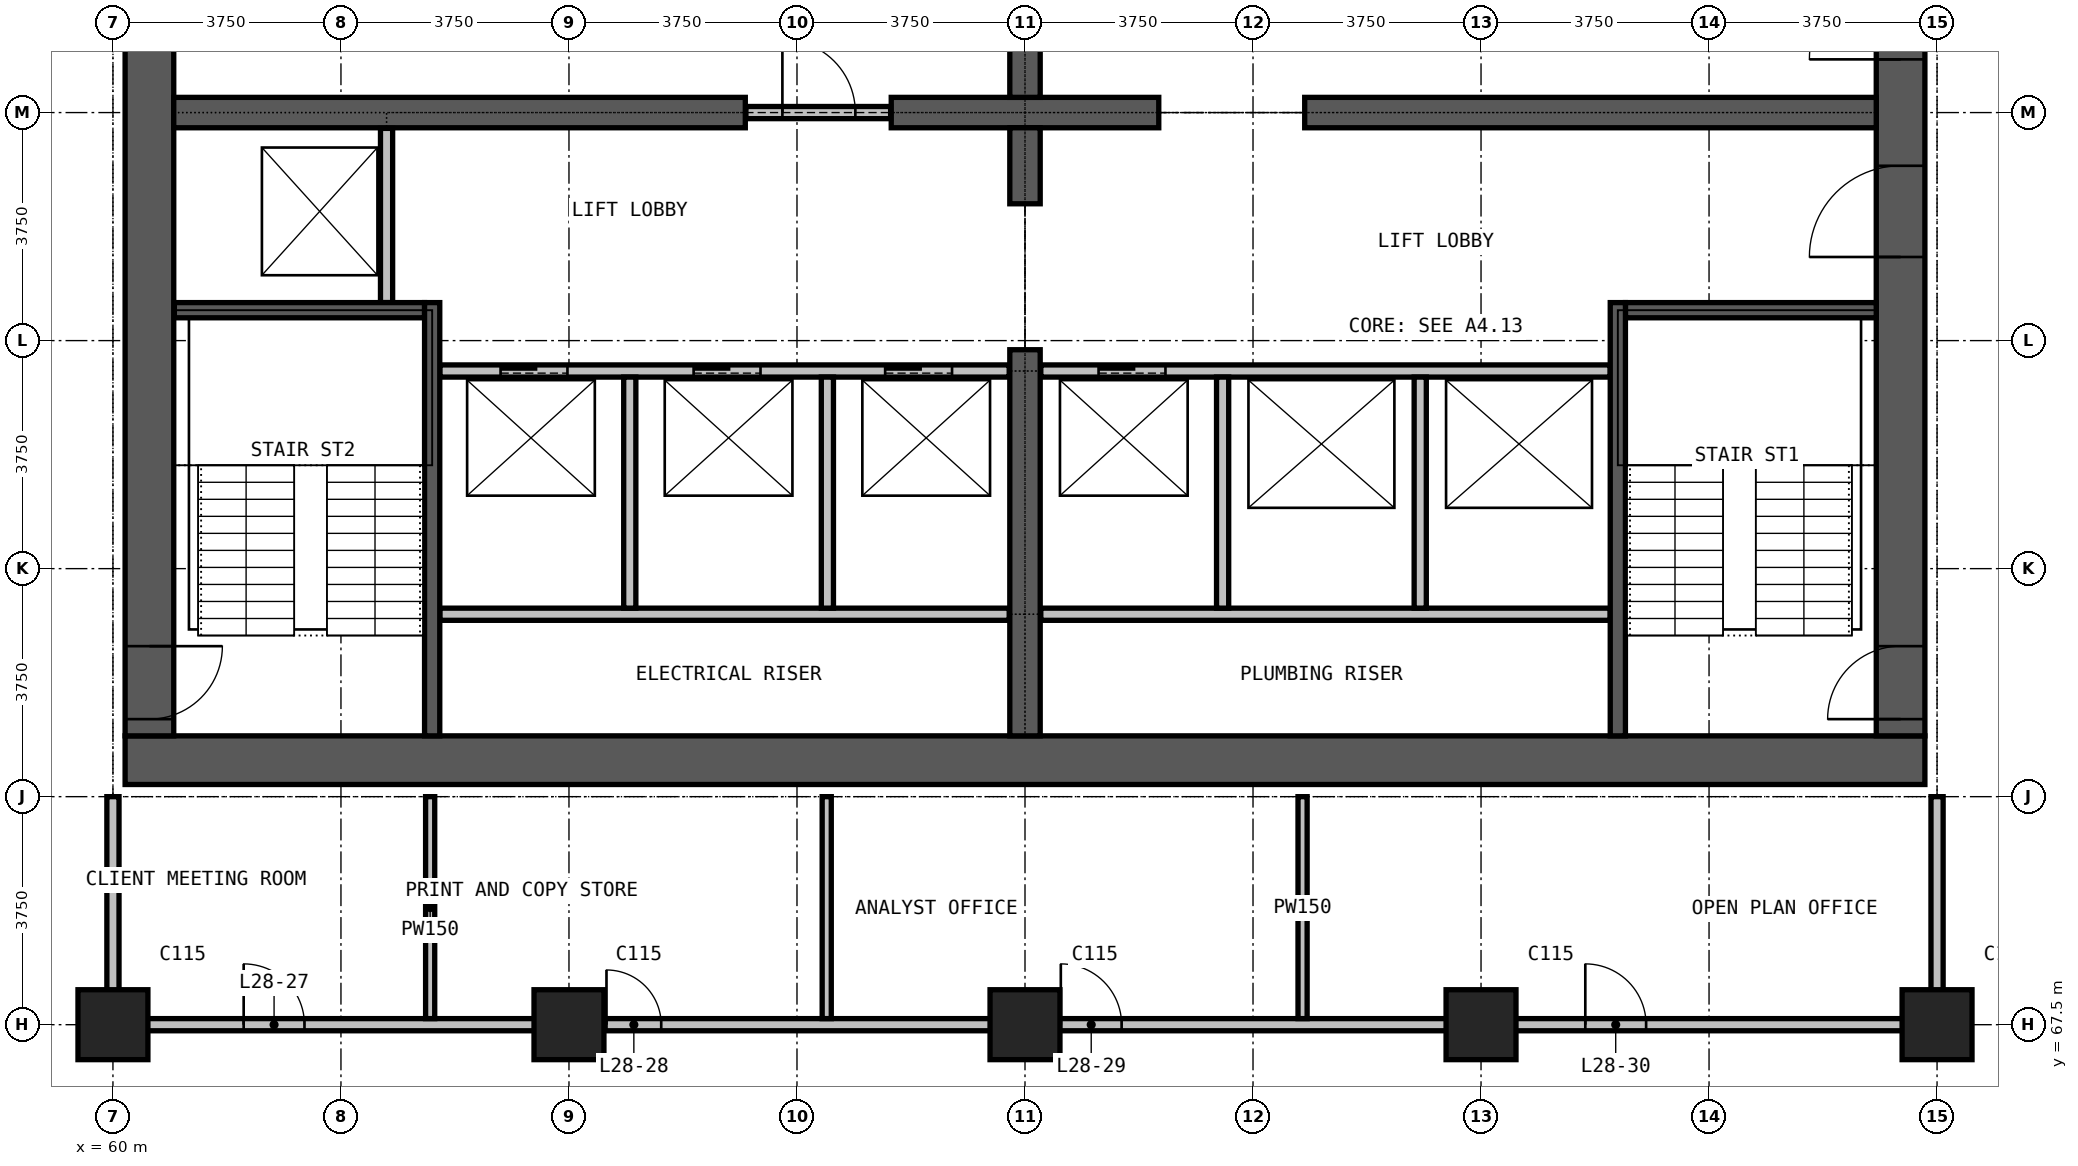
"""IFC4 building model, lengths in metres.
Left out: names, types, materials, properties, quantities, classifications, styles, units other than length and angle.
Written with IfcOpenShell. Run it as: python <this file> out.ifc"""

import sys

from ifc_helpers import new_model, si_unit, direction, frame, frame_2d, origin, origin_2d, place, context, subcontext, project, spatial, rectangle, extrude, element, fill, save


model = new_model("IFC4")
c1 = context("Model", 3, precision=1e-05, world=origin(), true_north=direction((0.0, 1.0)))
c2 = subcontext(c1, "Body", "Model", "MODEL_VIEW")
j1 = project(units=[si_unit("LENGTHUNIT", "METRE"), si_unit("PLANEANGLEUNIT", "RADIAN")], contexts=[c1])
p1 = place(None, origin())
s1 = spatial("IfcSite", under=j1, at=p1, CompositionType="ELEMENT")
p2 = place(p1, origin())
s2 = spatial("IfcBuilding", under=s1, at=p2, CompositionType="ELEMENT")
p3 = place(p2, frame((0.0, 0.0, 114.4)))
s3 = spatial("IfcBuildingStorey", under=s2, at=p3, CompositionType="ELEMENT", Elevation=114.4)
for number, where, z_axis, x_axis in (
    (1, (60.0, 67.5, 0.0), (0.0, 0.0, 1.0), (1.0, 0.0, 0.0)),
    (2, (67.5, 67.5, 0.0), (0.0, 0.0, 1.0), (1.0, 0.0, 0.0)),
    (3, (75.0, 67.5, 0.0), (0.0, 0.0, 1.0), (1.0, 0.0, 0.0)),
    (4, (82.5, 67.5, 0.0), (0.0, 0.0, 1.0), (1.0, 0.0, 0.0)),
    (5, (90.0, 67.5, 0.0), (0.0, 0.0, 1.0), (1.0, 0.0, 0.0)),
):
    element("IfcColumn", number, at=place(p3, frame(where, z_axis=z_axis, x_axis=x_axis)), inside=s3, PredefinedType="COLUMN", context=c2, shape_type="SweptSolid", body=[
        extrude(rectangle(XDim=1.15, YDim=1.15, at=origin_2d()), origin(), (0.0, 0.0, 1.0), 3.6),
    ])
p4 = place(p3, frame((60.2, 71.85, 0.0), z_axis=(0.0, 0.0, 1.0), x_axis=(1.0, 0.0, 0.0)))
e6 = element("IfcWall", 6, at=p4, inside=s3, PredefinedType="SHEAR", context=c2, shape_type="SweptSolid", body=[
    extrude(rectangle(XDim=29.6, YDim=0.8, at=frame_2d((14.8, 0.0))), origin(), (0.0, 0.0, 1.0), 3.6),
])
p5 = place(p3, frame((89.4, 72.25, 0.0), z_axis=(0.0, 0.0, 1.0), x_axis=(0.0, 1.0, 0.0)))
e7 = element("IfcWall", 7, at=p5, inside=s3, PredefinedType="SHEAR", context=c2, shape_type="SweptSolid", body=[
    extrude(rectangle(XDim=20.5, YDim=0.8, at=frame_2d((10.25, 0.0))), origin(), (0.0, 0.0, 1.0), 3.6),
])
p6 = place(p5, frame((0.275, 0.0, 0.0)))
e8 = element("IfcOpeningElement", 8, at=p6, cuts=e7, PredefinedType="OPENING", context=c2, shape_type="SweptSolid", body=[
    extrude(rectangle(XDim=1.2, YDim=2.2, at=frame_2d((0.6, 1.1))), frame((0.0, 0.41, 0.0), z_axis=(0.0, -1.0, 0.0), x_axis=(1.0, 0.0, 0.0)), (0.0, 0.0, 1.0), 0.82),
])
p7 = place(p5, frame((13.775, 0.0, 0.0)))
e9 = element("IfcOpeningElement", 9, at=p7, cuts=e7, PredefinedType="OPENING", context=c2, shape_type="SweptSolid", body=[
    extrude(rectangle(XDim=1.2, YDim=2.2, at=frame_2d((0.6, 1.1))), frame((0.0, 0.41, 0.0), z_axis=(0.0, -1.0, 0.0), x_axis=(1.0, 0.0, 0.0)), (0.0, 0.0, 1.0), 0.82),
])
p8 = place(p5, frame((7.875, 0.0, 0.0)))
e10 = element("IfcOpeningElement", 10, at=p8, cuts=e7, PredefinedType="OPENING", context=c2, shape_type="SweptSolid", body=[
    extrude(rectangle(XDim=1.5, YDim=2.2, at=frame_2d((0.75, 1.1))), frame((0.0, 0.41, 0.0), z_axis=(0.0, -1.0, 0.0), x_axis=(1.0, 0.0, 0.0)), (0.0, 0.0, 1.0), 0.82),
])
p9 = place(p5, frame((11.125, 0.0, 0.0)))
e11 = element("IfcOpeningElement", 11, at=p9, cuts=e7, PredefinedType="OPENING", context=c2, shape_type="SweptSolid", body=[
    extrude(rectangle(XDim=1.5, YDim=2.2, at=frame_2d((0.75, 1.1))), frame((0.0, 0.41, 0.0), z_axis=(0.0, -1.0, 0.0), x_axis=(1.0, 0.0, 0.0)), (0.0, 0.0, 1.0), 0.82),
])
p10 = place(p3, frame((60.6, 92.75, 0.0), z_axis=(0.0, 0.0, 1.0), x_axis=(0.0, -1.0, 0.0)))
e12 = element("IfcWall", 12, at=p10, inside=s3, PredefinedType="SHEAR", context=c2, shape_type="SweptSolid", body=[
    extrude(rectangle(XDim=20.5, YDim=0.8, at=frame_2d((10.25, 0.0))), origin(), (0.0, 0.0, 1.0), 3.6),
])
p11 = place(p10, frame((19.025, 0.0, 0.0)))
e13 = element("IfcOpeningElement", 13, at=p11, cuts=e12, PredefinedType="OPENING", context=c2, shape_type="SweptSolid", body=[
    extrude(rectangle(XDim=1.2, YDim=2.2, at=frame_2d((0.6, 1.1))), frame((0.0, 0.41, 0.0), z_axis=(0.0, -1.0, 0.0), x_axis=(1.0, 0.0, 0.0)), (0.0, 0.0, 1.0), 0.82),
])
p12 = place(p10, frame((8.025, 0.0, 0.0)))
e14 = element("IfcOpeningElement", 14, at=p12, cuts=e12, PredefinedType="OPENING", context=c2, shape_type="SweptSolid", body=[
    extrude(rectangle(XDim=1.2, YDim=2.2, at=frame_2d((0.6, 1.1))), frame((0.0, 0.41, 0.0), z_axis=(0.0, -1.0, 0.0), x_axis=(1.0, 0.0, 0.0)), (0.0, 0.0, 1.0), 0.82),
])
p13 = place(p3, frame((61.0, 82.5, 0.0), z_axis=(0.0, 0.0, 1.0), x_axis=(1.0, 0.0, 0.0)))
e15 = element("IfcWall", 15, at=p13, inside=s3, PredefinedType="SHEAR", context=c2, shape_type="SweptSolid", body=[
    extrude(rectangle(XDim=9.4, YDim=0.5, at=frame_2d((4.7, 0.0))), origin(), (0.0, 0.0, 1.0), 3.6),
])
p14 = place(p3, frame((72.8, 82.5, 0.0), z_axis=(0.0, 0.0, 1.0), x_axis=(1.0, 0.0, 0.0)))
e16 = element("IfcWall", 16, at=p14, inside=s3, PredefinedType="SHEAR", context=c2, shape_type="SweptSolid", body=[
    extrude(rectangle(XDim=4.4, YDim=0.5, at=frame_2d((2.2, 0.0))), origin(), (0.0, 0.0, 1.0), 3.6),
])
p15 = place(p3, frame((79.6, 82.5, 0.0), z_axis=(0.0, 0.0, 1.0), x_axis=(1.0, 0.0, 0.0)))
e17 = element("IfcWall", 17, at=p15, inside=s3, PredefinedType="SHEAR", context=c2, shape_type="SweptSolid", body=[
    extrude(rectangle(XDim=9.4, YDim=0.5, at=frame_2d((4.7, 0.0))), origin(), (0.0, 0.0, 1.0), 3.6),
])
p16 = place(p3, frame((75.0, 72.25, 0.0), z_axis=(0.0, 0.0, 1.0), x_axis=(0.0, 1.0, 0.0)))
e18 = element("IfcWall", 18, at=p16, inside=s3, PredefinedType="SHEAR", context=c2, shape_type="SweptSolid", body=[
    extrude(rectangle(XDim=6.35, YDim=0.5, at=frame_2d((3.175, 0.0))), origin(), (0.0, 0.0, 1.0), 3.6),
])
for number, where, z_axis, x_axis in (
    (19, (75.0, 81.0, 0.0), (0.0, 0.0, 1.0), (0.0, 1.0, 0.0)),
    (20, (75.0, 82.75, 0.0), (0.0, 0.0, 1.0), (0.0, 1.0, 0.0)),
):
    element("IfcWall", number, at=place(p3, frame(where, z_axis=z_axis, x_axis=x_axis)), inside=s3, PredefinedType="SHEAR", context=c2, shape_type="SweptSolid", body=[
        extrude(rectangle(XDim=1.25, YDim=0.5, at=frame_2d((0.625, 0.0))), origin(), (0.0, 0.0, 1.0), 3.6),
    ])
p17 = place(p3, frame((70.41, 82.5, 0.0), z_axis=(0.0, 0.0, 1.0), x_axis=(1.0, 0.0, 0.0)))
e21 = element("IfcWall", 21, at=p17, inside=s3, PredefinedType="PARTITIONING", context=c2, shape_type="SweptSolid", body=[
    extrude(rectangle(XDim=2.38, YDim=0.2, at=frame_2d((1.19, 0.0))), origin(), (0.0, 0.0, 1.0), 2.4),
])
p18 = place(p17, frame((0.6, 0.0, 0.0)))
e22 = element("IfcOpeningElement", 22, at=p18, cuts=e21, PredefinedType="OPENING", context=c2, shape_type="SweptSolid", body=[
    extrude(rectangle(XDim=1.2, YDim=2.2, at=frame_2d((0.6, 1.1))), frame((0.0, 0.11, 0.0), z_axis=(0.0, -1.0, 0.0), x_axis=(1.0, 0.0, 0.0)), (0.0, 0.0, 1.0), 0.22),
])
p19 = place(p3, frame((60.1, 67.5, 0.0), z_axis=(0.0, 0.0, 1.0), x_axis=(1.0, 0.0, 0.0)))
e23 = element("IfcWall", 23, at=p19, inside=s3, PredefinedType="PARTITIONING", context=c2, shape_type="SweptSolid", body=[
    extrude(rectangle(XDim=29.8, YDim=0.2, at=frame_2d((14.9, 0.0))), origin(), (0.0, 0.0, 1.0), 3.3),
])
p20 = place(p19, frame((2.05, 0.0, 0.0)))
e24 = element("IfcOpeningElement", 24, at=p20, cuts=e23, PredefinedType="OPENING", context=c2, shape_type="SweptSolid", body=[
    extrude(rectangle(XDim=1.0, YDim=2.2, at=frame_2d((0.5, 1.1))), frame((0.0, 0.11, 0.0), z_axis=(0.0, -1.0, 0.0), x_axis=(1.0, 0.0, 0.0)), (0.0, 0.0, 1.0), 0.22),
])
p21 = place(p19, frame((8.017, 0.0, 0.0)))
e25 = element("IfcOpeningElement", 25, at=p21, cuts=e23, PredefinedType="OPENING", context=c2, shape_type="SweptSolid", body=[
    extrude(rectangle(XDim=0.9, YDim=2.2, at=frame_2d((0.45, 1.1))), frame((0.0, 0.11, 0.0), z_axis=(0.0, -1.0, 0.0), x_axis=(1.0, 0.0, 0.0)), (0.0, 0.0, 1.0), 0.22),
])
p22 = place(p19, frame((15.489, 0.0, 0.0)))
e26 = element("IfcOpeningElement", 26, at=p22, cuts=e23, PredefinedType="OPENING", context=c2, shape_type="SweptSolid", body=[
    extrude(rectangle(XDim=1.0, YDim=2.2, at=frame_2d((0.5, 1.1))), frame((0.0, 0.11, 0.0), z_axis=(0.0, -1.0, 0.0), x_axis=(1.0, 0.0, 0.0)), (0.0, 0.0, 1.0), 0.22),
])
p23 = place(p19, frame((24.115, 0.0, 0.0)))
e27 = element("IfcOpeningElement", 27, at=p23, cuts=e23, PredefinedType="OPENING", context=c2, shape_type="SweptSolid", body=[
    extrude(rectangle(XDim=1.0, YDim=2.2, at=frame_2d((0.5, 1.1))), frame((0.0, 0.11, 0.0), z_axis=(0.0, -1.0, 0.0), x_axis=(1.0, 0.0, 0.0)), (0.0, 0.0, 1.0), 0.22),
])
for number, where, z_axis, x_axis in (
    (28, (60.0, 67.4, 0.0), (0.0, 0.0, 1.0), (0.0, 1.0, 0.0)),
    (29, (90.0, 67.4, 0.0), (0.0, 0.0, 1.0), (0.0, 1.0, 0.0)),
):
    element("IfcWall", number, at=place(p3, frame(where, z_axis=z_axis, x_axis=x_axis)), inside=s3, PredefinedType="PARTITIONING", context=c2, shape_type="SweptSolid", body=[
        extrude(rectangle(XDim=3.85, YDim=0.2, at=frame_2d((1.925, 0.0))), origin(), (0.0, 0.0, 1.0), 3.3),
    ])
for number, where, z_axis, x_axis in (
    (30, (65.217, 67.6, 0.0), (0.0, 0.0, 1.0), (0.0, 1.0, 0.0)),
    (31, (71.739, 67.6, 0.0), (0.0, 0.0, 1.0), (0.0, 1.0, 0.0)),
    (32, (79.565, 67.6, 0.0), (0.0, 0.0, 1.0), (0.0, 1.0, 0.0)),
):
    element("IfcWall", number, at=place(p3, frame(where, z_axis=z_axis, x_axis=x_axis)), inside=s3, PredefinedType="PARTITIONING", context=c2, shape_type="SweptSolid", body=[
        extrude(rectangle(XDim=3.65, YDim=0.15, at=frame_2d((1.825, 0.0))), origin(), (0.0, 0.0, 1.0), 3.3),
    ])
for number, where, z_axis, x_axis in (
    (33, (65.375, 74.25, 0.0), (0.0, 0.0, 1.0), (1.0, 0.0, 0.0)),
    (34, (75.26, 74.25, 0.0), (0.0, 0.0, 1.0), (1.0, 0.0, 0.0)),
):
    element("IfcWall", number, at=place(p3, frame(where, z_axis=z_axis, x_axis=x_axis)), inside=s3, PredefinedType="PARTITIONING", context=c2, shape_type="SweptSolid", body=[
        extrude(rectangle(XDim=9.365, YDim=0.2, at=frame_2d((4.683, 0.0))), origin(), (0.0, 0.0, 1.0), 3.3),
    ])
p24 = place(p3, frame((65.375, 78.25, 0.0), z_axis=(0.0, 0.0, 1.0), x_axis=(1.0, 0.0, 0.0)))
e35 = element("IfcWall", 35, at=p24, inside=s3, PredefinedType="PARTITIONING", context=c2, shape_type="SweptSolid", body=[
    extrude(rectangle(XDim=9.365, YDim=0.2, at=frame_2d((4.683, 0.0))), origin(), (0.0, 0.0, 1.0), 3.3),
])
p25 = place(p24, frame((1.0, 0.0, 0.0)))
e36 = element("IfcOpeningElement", 36, at=p25, cuts=e35, PredefinedType="OPENING", context=c2, shape_type="SweptSolid", body=[
    extrude(rectangle(XDim=1.1, YDim=2.2, at=frame_2d((0.55, 1.1))), frame((0.0, 0.11, 0.0), z_axis=(0.0, -1.0, 0.0), x_axis=(1.0, 0.0, 0.0)), (0.0, 0.0, 1.0), 0.22),
])
p26 = place(p24, frame((4.175, 0.0, 0.0)))
e37 = element("IfcOpeningElement", 37, at=p26, cuts=e35, PredefinedType="OPENING", context=c2, shape_type="SweptSolid", body=[
    extrude(rectangle(XDim=1.1, YDim=2.2, at=frame_2d((0.55, 1.1))), frame((0.0, 0.11, 0.0), z_axis=(0.0, -1.0, 0.0), x_axis=(1.0, 0.0, 0.0)), (0.0, 0.0, 1.0), 0.22),
])
p27 = place(p24, frame((7.325, 0.0, 0.0)))
e38 = element("IfcOpeningElement", 38, at=p27, cuts=e35, PredefinedType="OPENING", context=c2, shape_type="SweptSolid", body=[
    extrude(rectangle(XDim=1.1, YDim=2.2, at=frame_2d((0.55, 1.1))), frame((0.0, 0.11, 0.0), z_axis=(0.0, -1.0, 0.0), x_axis=(1.0, 0.0, 0.0)), (0.0, 0.0, 1.0), 0.22),
])
p28 = place(p3, frame((75.26, 78.25, 0.0), z_axis=(0.0, 0.0, 1.0), x_axis=(1.0, 0.0, 0.0)))
e39 = element("IfcWall", 39, at=p28, inside=s3, PredefinedType="PARTITIONING", context=c2, shape_type="SweptSolid", body=[
    extrude(rectangle(XDim=9.365, YDim=0.2, at=frame_2d((4.683, 0.0))), origin(), (0.0, 0.0, 1.0), 3.3),
])
p29 = place(p28, frame((0.95, 0.0, 0.0)))
e40 = element("IfcOpeningElement", 40, at=p29, cuts=e39, PredefinedType="OPENING", context=c2, shape_type="SweptSolid", body=[
    extrude(rectangle(XDim=1.1, YDim=2.2, at=frame_2d((0.55, 1.1))), frame((0.0, 0.11, 0.0), z_axis=(0.0, -1.0, 0.0), x_axis=(1.0, 0.0, 0.0)), (0.0, 0.0, 1.0), 0.22),
])
p30 = place(p3, frame((64.5, 79.375, 0.0), z_axis=(0.0, 0.0, 1.0), x_axis=(0.0, 1.0, 0.0)))
e41 = element("IfcWall", 41, at=p30, inside=s3, PredefinedType="PARTITIONING", context=c2, shape_type="SweptSolid", body=[
    extrude(rectangle(XDim=2.865, YDim=0.2, at=frame_2d((1.433, 0.0))), origin(), (0.0, 0.0, 1.0), 3.3),
])
for number, where, z_axis, x_axis in (
    (42, (68.5, 74.35, 0.0), (0.0, 0.0, 1.0), (0.0, 1.0, 0.0)),
    (43, (71.75, 74.35, 0.0), (0.0, 0.0, 1.0), (0.0, 1.0, 0.0)),
    (44, (78.25, 74.35, 0.0), (0.0, 0.0, 1.0), (0.0, 1.0, 0.0)),
    (45, (81.5, 74.35, 0.0), (0.0, 0.0, 1.0), (0.0, 1.0, 0.0)),
):
    element("IfcWall", number, at=place(p3, frame(where, z_axis=z_axis, x_axis=x_axis)), inside=s3, PredefinedType="PARTITIONING", context=c2, shape_type="SweptSolid", body=[
        extrude(rectangle(XDim=3.8, YDim=0.2, at=frame_2d((1.9, 0.0))), origin(), (0.0, 0.0, 1.0), 3.3),
    ])
p31 = place(p3, frame((61.01, 79.25, 0.0), z_axis=(0.0, 0.0, 1.0), x_axis=(1.0, 0.0, 0.0)))
e46 = element("IfcWall", 46, at=p31, inside=s3, PredefinedType="PARTITIONING", context=c2, shape_type="SweptSolid", body=[
    extrude(rectangle(XDim=4.115, YDim=0.25, at=frame_2d((2.058, 0.0))), origin(), (0.0, 0.0, 1.0), 3.3),
])
p32 = place(p3, frame((84.875, 79.25, 0.0), z_axis=(0.0, 0.0, 1.0), x_axis=(1.0, 0.0, 0.0)))
e47 = element("IfcWall", 47, at=p32, inside=s3, PredefinedType="PARTITIONING", context=c2, shape_type="SweptSolid", body=[
    extrude(rectangle(XDim=4.125, YDim=0.25, at=frame_2d((2.062, 0.0))), origin(), (0.0, 0.0, 1.0), 3.3),
])
for number, where, z_axis, x_axis in (
    (48, (65.25, 72.25, 0.0), (0.0, 0.0, 1.0), (0.0, 1.0, 0.0)),
    (49, (84.75, 72.25, 0.0), (0.0, 0.0, 1.0), (0.0, 1.0, 0.0)),
):
    element("IfcWall", number, at=place(p3, frame(where, z_axis=z_axis, x_axis=x_axis)), inside=s3, PredefinedType="PARTITIONING", context=c2, shape_type="SweptSolid", body=[
        extrude(rectangle(XDim=7.125, YDim=0.25, at=frame_2d((3.562, 0.0))), origin(), (0.0, 0.0, 1.0), 3.3),
    ])
p33 = place(p25, origin())
e50 = element("IfcDoor", 50, at=p33, inside=s3, OperationType="DOUBLE_DOOR_SLIDING", PredefinedType="DOOR", context=c2, shape_type="SweptSolid", body=[
    extrude(rectangle(XDim=1.1, YDim=2.2, at=frame_2d((0.55, 1.1))), frame((0.0, 0.025, 0.0), z_axis=(0.0, -1.0, 0.0), x_axis=(1.0, 0.0, 0.0)), (0.0, 0.0, 1.0), 0.05),
])
fill(e36, e50)
p34 = place(p26, origin())
e51 = element("IfcDoor", 51, at=p34, inside=s3, OperationType="DOUBLE_DOOR_SLIDING", PredefinedType="DOOR", context=c2, shape_type="SweptSolid", body=[
    extrude(rectangle(XDim=1.1, YDim=2.2, at=frame_2d((0.55, 1.1))), frame((0.0, 0.025, 0.0), z_axis=(0.0, -1.0, 0.0), x_axis=(1.0, 0.0, 0.0)), (0.0, 0.0, 1.0), 0.05),
])
fill(e37, e51)
p35 = place(p27, origin())
e52 = element("IfcDoor", 52, at=p35, inside=s3, OperationType="DOUBLE_DOOR_SLIDING", PredefinedType="DOOR", context=c2, shape_type="SweptSolid", body=[
    extrude(rectangle(XDim=1.1, YDim=2.2, at=frame_2d((0.55, 1.1))), frame((0.0, 0.025, 0.0), z_axis=(0.0, -1.0, 0.0), x_axis=(1.0, 0.0, 0.0)), (0.0, 0.0, 1.0), 0.05),
])
fill(e38, e52)
p36 = place(p29, origin())
e53 = element("IfcDoor", 53, at=p36, inside=s3, OperationType="DOUBLE_DOOR_SLIDING", PredefinedType="DOOR", context=c2, shape_type="SweptSolid", body=[
    extrude(rectangle(XDim=1.1, YDim=2.2, at=frame_2d((0.55, 1.1))), frame((0.0, 0.025, 0.0), z_axis=(0.0, -1.0, 0.0), x_axis=(1.0, 0.0, 0.0)), (0.0, 0.0, 1.0), 0.05),
])
fill(e40, e53)
p37 = place(p18, origin())
e54 = element("IfcDoor", 54, at=p37, inside=s3, OperationType="SINGLE_SWING_RIGHT", PredefinedType="DOOR", context=c2, shape_type="SweptSolid", body=[
    extrude(rectangle(XDim=1.2, YDim=2.2, at=frame_2d((0.6, 1.1))), frame((0.0, 0.025, 0.0), z_axis=(0.0, -1.0, 0.0), x_axis=(1.0, 0.0, 0.0)), (0.0, 0.0, 1.0), 0.05),
])
fill(e22, e54)
p38 = place(p6, origin())
e55 = element("IfcDoor", 55, at=p38, inside=s3, OperationType="SINGLE_SWING_LEFT", PredefinedType="DOOR", context=c2, shape_type="SweptSolid", body=[
    extrude(rectangle(XDim=1.2, YDim=2.2, at=frame_2d((0.6, 1.1))), frame((0.0, 0.025, 0.0), z_axis=(0.0, -1.0, 0.0), x_axis=(1.0, 0.0, 0.0)), (0.0, 0.0, 1.0), 0.05),
])
fill(e8, e55)
p39 = place(p11, origin())
e56 = element("IfcDoor", 56, at=p39, inside=s3, OperationType="SINGLE_SWING_LEFT", PredefinedType="DOOR", context=c2, shape_type="SweptSolid", body=[
    extrude(rectangle(XDim=1.2, YDim=2.2, at=frame_2d((0.6, 1.1))), frame((0.0, 0.025, 0.0), z_axis=(0.0, -1.0, 0.0), x_axis=(1.0, 0.0, 0.0)), (0.0, 0.0, 1.0), 0.05),
])
fill(e13, e56)
p40 = place(p8, origin())
e57 = element("IfcDoor", 57, at=p40, inside=s3, OperationType="DOUBLE_DOOR_SINGLE_SWING", PredefinedType="DOOR", context=c2, shape_type="SweptSolid", body=[
    extrude(rectangle(XDim=1.5, YDim=2.2, at=frame_2d((0.75, 1.1))), frame((0.0, 0.025, 0.0), z_axis=(0.0, -1.0, 0.0), x_axis=(1.0, 0.0, 0.0)), (0.0, 0.0, 1.0), 0.05),
])
fill(e10, e57)
p41 = place(p9, origin())
e58 = element("IfcDoor", 58, at=p41, inside=s3, OperationType="DOUBLE_DOOR_SINGLE_SWING", PredefinedType="DOOR", context=c2, shape_type="SweptSolid", body=[
    extrude(rectangle(XDim=1.5, YDim=2.2, at=frame_2d((0.75, 1.1))), frame((0.0, 0.025, 0.0), z_axis=(0.0, -1.0, 0.0), x_axis=(1.0, 0.0, 0.0)), (0.0, 0.0, 1.0), 0.05),
])
fill(e11, e58)
p42 = place(p20, origin())
e59 = element("IfcDoor", 59, at=p42, inside=s3, OperationType="SINGLE_SWING_LEFT", PredefinedType="DOOR", context=c2, shape_type="SweptSolid", body=[
    extrude(rectangle(XDim=1.0, YDim=2.2, at=frame_2d((0.5, 1.1))), frame((0.0, 0.025, 0.0), z_axis=(0.0, -1.0, 0.0), x_axis=(1.0, 0.0, 0.0)), (0.0, 0.0, 1.0), 0.05),
])
fill(e24, e59)
p43 = place(p21, origin())
e60 = element("IfcDoor", 60, at=p43, inside=s3, OperationType="SINGLE_SWING_RIGHT", PredefinedType="DOOR", context=c2, shape_type="SweptSolid", body=[
    extrude(rectangle(XDim=0.9, YDim=2.2, at=frame_2d((0.45, 1.1))), frame((0.0, 0.025, 0.0), z_axis=(0.0, -1.0, 0.0), x_axis=(1.0, 0.0, 0.0)), (0.0, 0.0, 1.0), 0.05),
])
fill(e25, e60)
p44 = place(p22, origin())
e61 = element("IfcDoor", 61, at=p44, inside=s3, OperationType="SINGLE_SWING_LEFT", PredefinedType="DOOR", context=c2, shape_type="SweptSolid", body=[
    extrude(rectangle(XDim=1.0, YDim=2.2, at=frame_2d((0.5, 1.1))), frame((0.0, 0.025, 0.0), z_axis=(0.0, -1.0, 0.0), x_axis=(1.0, 0.0, 0.0)), (0.0, 0.0, 1.0), 0.05),
])
fill(e26, e61)
p45 = place(p23, origin())
e62 = element("IfcDoor", 62, at=p45, inside=s3, OperationType="SINGLE_SWING_LEFT", PredefinedType="DOOR", context=c2, shape_type="SweptSolid", body=[
    extrude(rectangle(XDim=1.0, YDim=2.2, at=frame_2d((0.5, 1.1))), frame((0.0, 0.025, 0.0), z_axis=(0.0, -1.0, 0.0), x_axis=(1.0, 0.0, 0.0)), (0.0, 0.0, 1.0), 0.05),
])
fill(e27, e62)
save(model, sys.argv[1])
